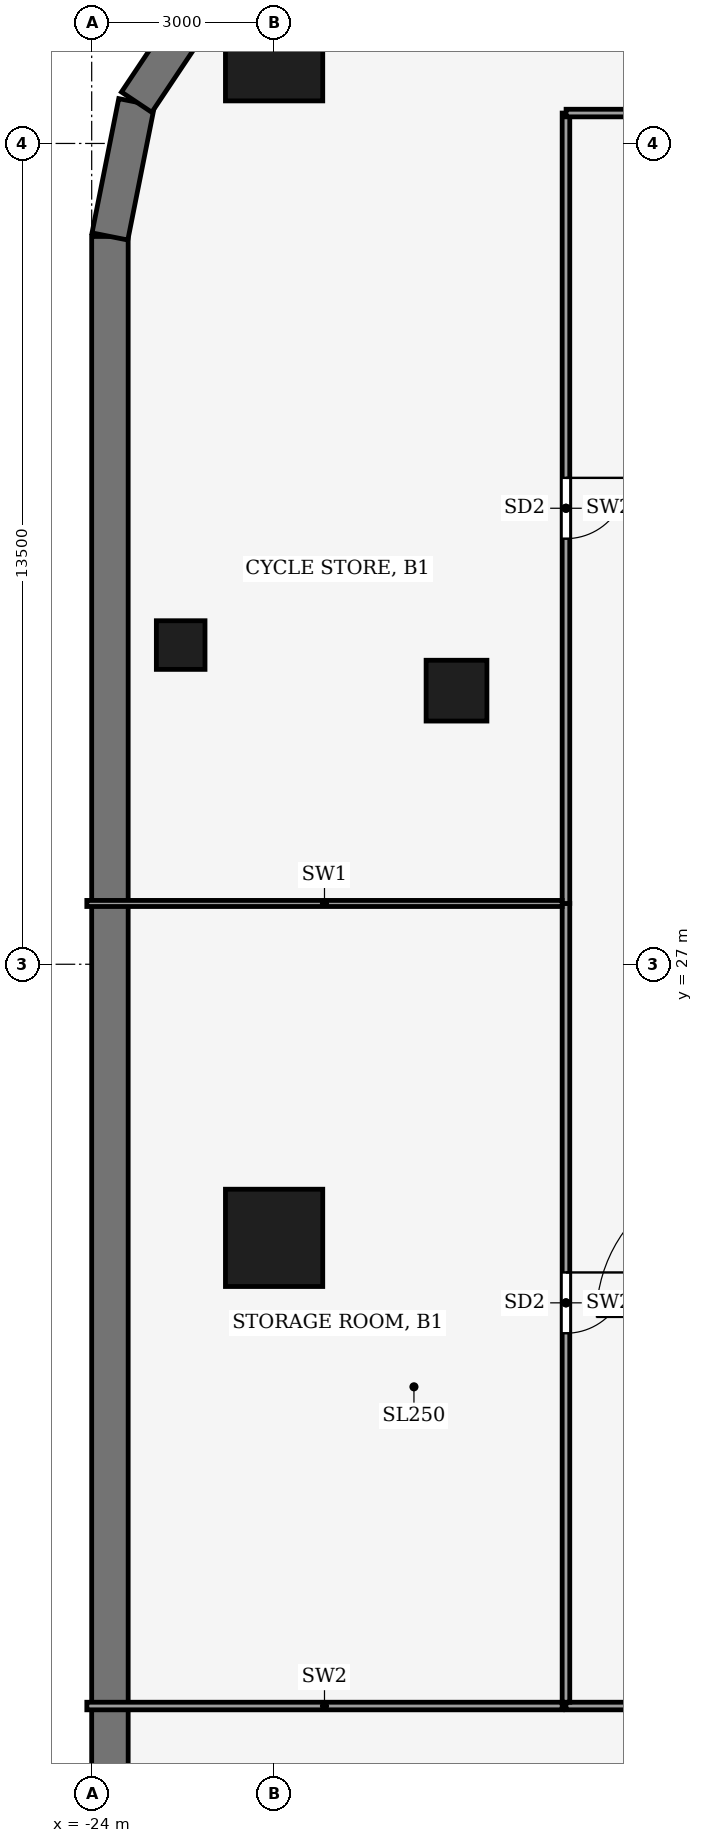
"""IFC4 building model, lengths in metres.
Left out: names, types, materials, properties, quantities, classifications, styles, units other than length and angle.
Written with IfcOpenShell. Run it as: python <this file> out.ifc"""

import sys

from ifc_helpers import new_model, si_unit, direction, frame, frame_2d, origin, origin_2d, place, context, subcontext, project, spatial, rectangle, hollow_rectangle, extrude, element, fill, save


model = new_model("IFC4")
c1 = context("Model", 3, precision=1e-05, world=origin(), true_north=direction((0.0, 1.0)))
c2 = subcontext(c1, "Body", "Model", "MODEL_VIEW")
j1 = project(units=[si_unit("LENGTHUNIT", "METRE"), si_unit("PLANEANGLEUNIT", "RADIAN")], contexts=[c1])
p1 = place(None, origin())
s1 = spatial("IfcSite", under=j1, at=p1, CompositionType="ELEMENT")
p2 = place(p1, origin())
s2 = spatial("IfcBuilding", under=s1, at=p2, CompositionType="ELEMENT")
p3 = place(p2, frame((0.0, 0.0, -6.0)))
s3 = spatial("IfcBuildingStorey", under=s2, at=p3, CompositionType="ELEMENT", Elevation=-6.0)
p4 = place(p3, frame((-23.7, 0.03, 0.0), z_axis=(0.0, 0.0, 1.0), x_axis=(0.0, 1.0, 0.0)))
e1 = element("IfcWall", 1, at=p4, inside=s3, PredefinedType="SHEAR", context=c2, shape_type="SweptSolid", body=[
    extrude(rectangle(XDim=38.941, YDim=0.6, at=frame_2d((19.47, 0.0))), origin(), (0.0, 0.0, 1.0), 5.55),
])
p5 = place(p3, frame((-23.7, 38.97, 0.0), z_axis=(0.0, 0.0, 1.0), x_axis=(0.195052642224, 0.980792774628, 0.0)))
e2 = element("IfcWall", 2, at=p5, inside=s3, PredefinedType="SHEAR", context=c2, shape_type="SweptSolid", body=[
    extrude(rectangle(XDim=2.252, YDim=0.6, at=frame_2d((1.126, 0.0))), origin(), (0.0, 0.0, 1.0), 5.55),
])
p6 = place(p3, frame((-23.261, 41.179, 0.0), z_axis=(0.0, 0.0, 1.0), x_axis=(0.555562047437, 0.831475081676, 0.0)))
e3 = element("IfcWall", 3, at=p6, inside=s3, PredefinedType="SHEAR", context=c2, shape_type="SweptSolid", body=[
    extrude(rectangle(XDim=2.222, YDim=0.6, at=frame_2d((1.111, 0.0))), origin(), (0.0, 0.0, 1.0), 5.55),
])
for number, where, z_axis, x_axis in (
    (4, (-21.0, 42.0, 0.0), (0.0, 0.0, 1.0), (1.0, 0.0, 0.0)),
    (5, (-21.0, 22.5, 0.0), (0.0, 0.0, 1.0), (1.0, 0.0, 0.0)),
):
    element("IfcColumn", number, at=place(p3, frame(where, z_axis=z_axis, x_axis=x_axis)), inside=s3, PredefinedType="COLUMN", context=c2, shape_type="SweptSolid", body=[
        extrude(hollow_rectangle(XDim=1.6, YDim=1.6, WallThickness=0.09, at=origin_2d()), origin(), (0.0, 0.0, 1.0), 6.0),
    ])
p7 = place(p3, frame((-22.536, 32.25, 0.0), z_axis=(0.0, 0.0, 1.0), x_axis=(1.0, 0.0, 0.0)))
e6 = element("IfcColumn", 6, at=p7, inside=s3, PredefinedType="COLUMN", context=c2, shape_type="SweptSolid", body=[
    extrude(hollow_rectangle(XDim=0.8, YDim=0.8, WallThickness=0.04, at=origin_2d()), origin(), (0.0, 0.0, 1.0), 6.0),
])
p8 = place(p3, frame((-18.0, 31.5, 0.0), z_axis=(0.0, 0.0, 1.0), x_axis=(1.0, 0.0, 0.0)))
e7 = element("IfcColumn", 7, at=p8, inside=s3, PredefinedType="COLUMN", context=c2, shape_type="SweptSolid", body=[
    extrude(rectangle(XDim=1.0, YDim=1.0, at=origin_2d()), origin(), (0.0, 0.0, 1.0), 6.0),
])
p9 = place(p3, frame((-12.0, 14.8, 0.0), z_axis=(0.0, 0.0, 1.0), x_axis=(-1.0, 0.0, 0.0)))
e8 = element("IfcWall", 8, at=p9, inside=s3, PredefinedType="PARTITIONING", context=c2, shape_type="SweptSolid", body=[
    extrude(rectangle(XDim=4.2, YDim=0.125, at=frame_2d((2.1, 0.0))), origin(), (0.0, 0.0, 1.0), 5.55),
])
p10 = place(p3, frame((-16.2, 28.0, 0.0), z_axis=(0.0, 0.0, 1.0), x_axis=(0.0, -1.0, 0.0)))
e9 = element("IfcWall", 9, at=p10, inside=s3, PredefinedType="PARTITIONING", context=c2, shape_type="SweptSolid", body=[
    extrude(rectangle(XDim=13.137, YDim=0.125, at=frame_2d((6.569, 0.0))), origin(), (0.0, 0.0, 1.0), 5.55),
])
p11 = place(p10, frame((6.069, 0.0, 0.0)))
e10 = element("IfcOpeningElement", 10, at=p11, cuts=e9, PredefinedType="OPENING", context=c2, shape_type="SweptSolid", body=[
    extrude(rectangle(XDim=1.0, YDim=2.1, at=frame_2d((0.5, 1.05))), frame((0.0, 0.073, 0.0), z_axis=(0.0, -1.0, 0.0), x_axis=(1.0, 0.0, 0.0)), (0.0, 0.0, 1.0), 0.145),
])
p12 = place(p3, frame((-16.2, 41.0, 0.0), z_axis=(0.0, 0.0, 1.0), x_axis=(0.0, -1.0, 0.0)))
e11 = element("IfcWall", 11, at=p12, inside=s3, PredefinedType="PARTITIONING", context=c2, shape_type="SweptSolid", body=[
    extrude(rectangle(XDim=13.0, YDim=0.125, at=frame_2d((6.5, 0.0))), origin(), (0.0, 0.0, 1.0), 5.55),
])
p13 = place(p12, frame((6.0, 0.0, 0.0)))
e12 = element("IfcOpeningElement", 12, at=p13, cuts=e11, PredefinedType="OPENING", context=c2, shape_type="SweptSolid", body=[
    extrude(rectangle(XDim=1.0, YDim=2.1, at=frame_2d((0.5, 1.05))), frame((0.0, 0.073, 0.0), z_axis=(0.0, -1.0, 0.0), x_axis=(1.0, 0.0, 0.0)), (0.0, 0.0, 1.0), 0.145),
])
p14 = place(p3, frame((-24.08, 14.8, 0.0), z_axis=(0.0, 0.0, 1.0), x_axis=(1.0, 0.0, 0.0)))
e13 = element("IfcWall", 13, at=p14, inside=s3, PredefinedType="PARTITIONING", context=c2, shape_type="SweptSolid", body=[
    extrude(rectangle(XDim=7.818, YDim=0.125, at=frame_2d((3.909, 0.0))), origin(), (0.0, 0.0, 1.0), 5.55),
])
p15 = place(p3, frame((-24.08, 28.0, 0.0), z_axis=(0.0, 0.0, 1.0), x_axis=(1.0, 0.0, 0.0)))
e14 = element("IfcWall", 14, at=p15, inside=s3, PredefinedType="PARTITIONING", context=c2, shape_type="SweptSolid", body=[
    extrude(rectangle(XDim=7.818, YDim=0.1, at=frame_2d((3.909, 0.0))), origin(), (0.0, 0.0, 1.0), 5.55),
])
p16 = place(p3, frame((-16.198, 41.0, 0.0), z_axis=(0.0, 0.0, 1.0), x_axis=(1.0, 0.0, 0.0)))
e15 = element("IfcWall", 15, at=p16, inside=s3, PredefinedType="PARTITIONING", context=c2, shape_type="SweptSolid", body=[
    extrude(rectangle(XDim=32.396, YDim=0.125, at=frame_2d((16.198, 0.0))), origin(), (0.0, 0.0, 1.0), 5.55),
])
p17 = place(p11, origin())
e16 = element("IfcDoor", 16, at=p17, inside=s3, OperationType="SINGLE_SWING_LEFT", PredefinedType="DOOR", context=c2, shape_type="SweptSolid", body=[
    extrude(rectangle(XDim=1.0, YDim=2.1, at=frame_2d((0.5, 1.05))), frame((0.0, 0.025, 0.0), z_axis=(0.0, -1.0, 0.0), x_axis=(1.0, 0.0, 0.0)), (0.0, 0.0, 1.0), 0.05),
])
fill(e10, e16)
p18 = place(p13, origin())
e17 = element("IfcDoor", 17, at=p18, inside=s3, OperationType="SINGLE_SWING_RIGHT", PredefinedType="DOOR", context=c2, shape_type="SweptSolid", body=[
    extrude(rectangle(XDim=1.0, YDim=2.1, at=frame_2d((0.5, 1.05))), frame((0.0, 0.025, 0.0), z_axis=(0.0, -1.0, 0.0), x_axis=(1.0, 0.0, 0.0)), (0.0, 0.0, 1.0), 0.05),
])
fill(e12, e17)
save(model, sys.argv[1])
